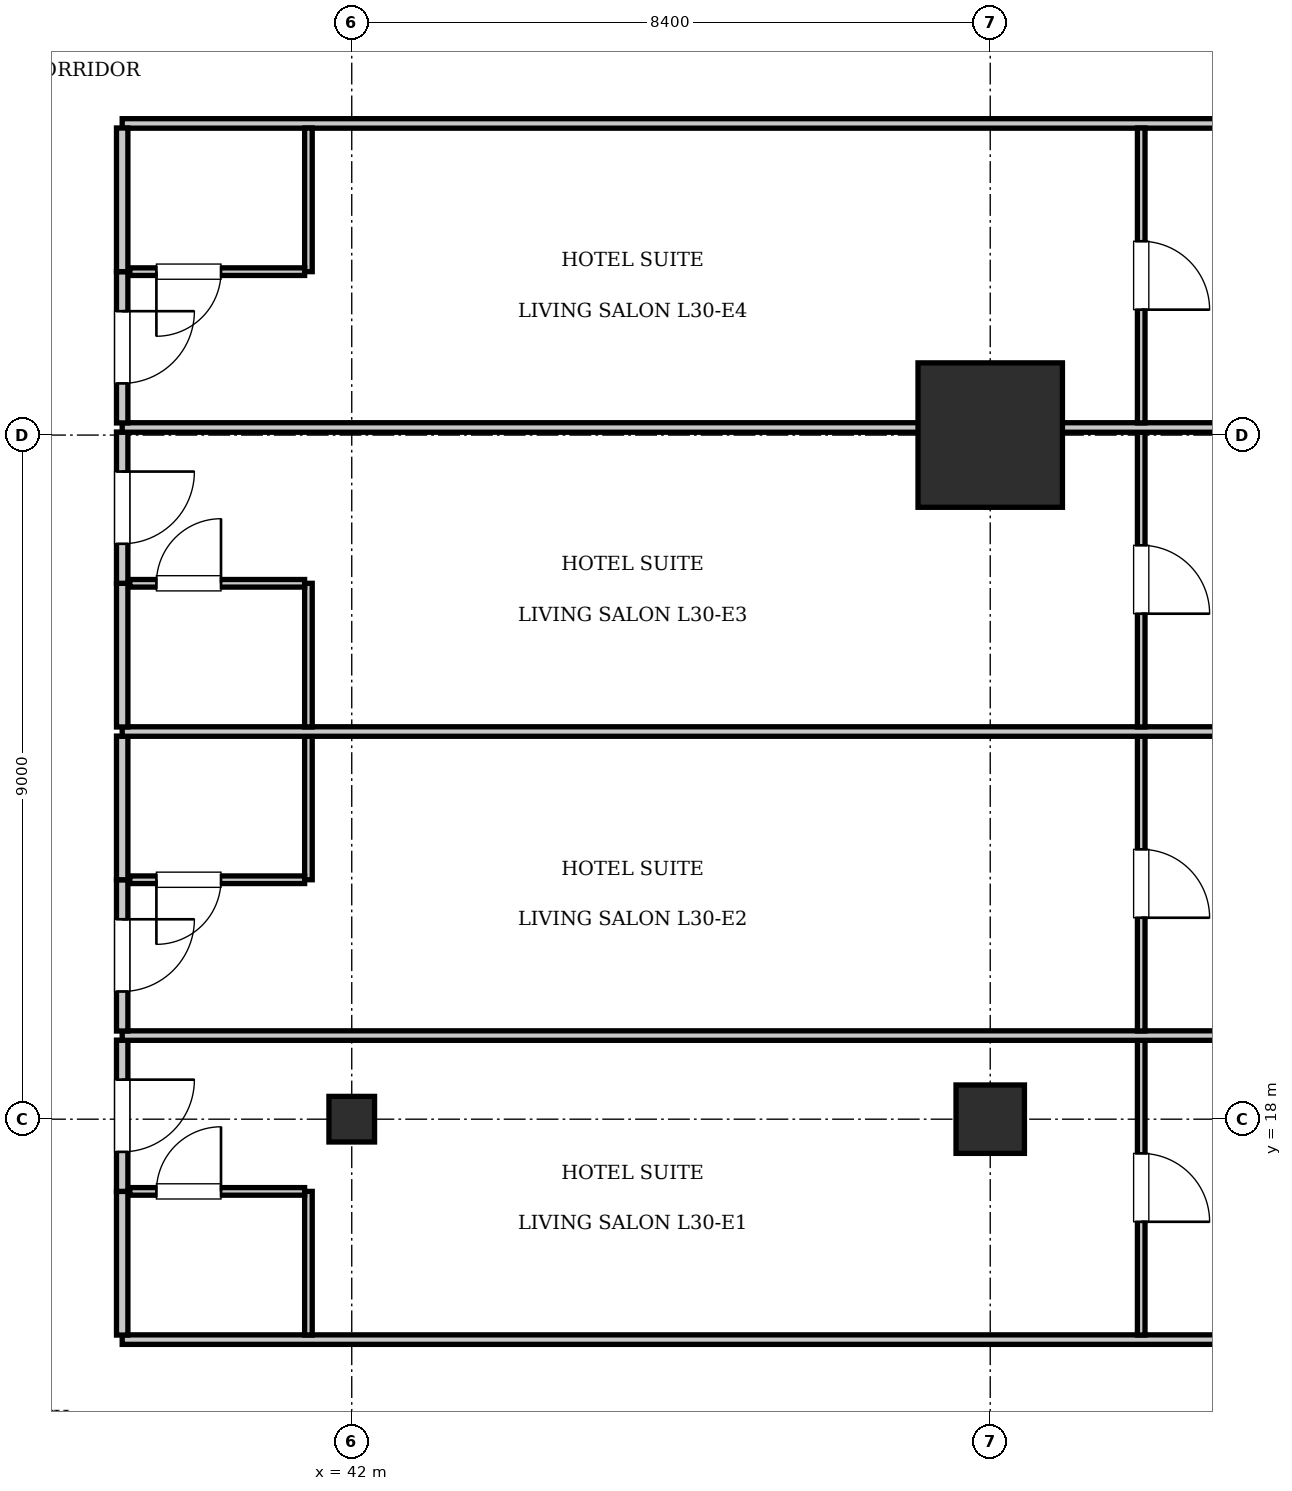
"""IFC4 building model, lengths in metres.
Left out: names, types, materials, properties, quantities, classifications, styles, units other than length and angle.
Written with IfcOpenShell. Run it as: python <this file> out.ifc"""

import sys

from ifc_helpers import new_model, si_unit, direction, frame, frame_2d, origin, origin_2d, place, context, subcontext, project, spatial, rectangle, i_section, extrude, element, fill, save


model = new_model("IFC4")
c1 = context("Model", 3, precision=1e-05, world=origin(), true_north=direction((0.0, 1.0)))
c2 = subcontext(c1, "Body", "Model", "MODEL_VIEW")
j1 = project(units=[si_unit("LENGTHUNIT", "METRE"), si_unit("PLANEANGLEUNIT", "RADIAN")], contexts=[c1])
p1 = place(None, origin())
s1 = spatial("IfcSite", under=j1, at=p1, CompositionType="ELEMENT")
p2 = place(p1, origin())
s2 = spatial("IfcBuilding", under=s1, at=p2, CompositionType="ELEMENT")
p3 = place(p2, frame((0.0, 0.0, 127.4)))
s3 = spatial("IfcBuildingStorey", under=s2, at=p3, CompositionType="ELEMENT", Elevation=127.4)
p4 = place(p3, frame((50.4, 27.0, 0.0), z_axis=(0.0, 0.0, 1.0), x_axis=(1.0, 0.0, 0.0)))
e1 = element("IfcColumn", 1, at=p4, inside=s3, PredefinedType="COLUMN", context=c2, shape_type="SweptSolid", body=[
    extrude(rectangle(XDim=1.9, YDim=1.9, at=origin_2d()), origin(), (0.0, 0.0, 1.0), 3.85),
])
p5 = place(p3, frame((50.4, 18.0, 0.0), z_axis=(0.0, 0.0, 1.0), x_axis=(1.0, 0.0, 0.0)))
e2 = element("IfcColumn", 2, at=p5, inside=s3, PredefinedType="COLUMN", context=c2, shape_type="SweptSolid", body=[
    extrude(rectangle(XDim=0.9, YDim=0.9, at=origin_2d()), origin(), (0.0, 0.0, 1.0), 3.85),
])
p6 = place(p3, frame((42.0, 18.0, 0.0), z_axis=(0.0, 0.0, 1.0), x_axis=(1.0, 0.0, 0.0)))
e3 = element("IfcColumn", 3, at=p6, inside=s3, PredefinedType="COLUMN", context=c2, shape_type="SweptSolid", body=[
    extrude(i_section(OverallWidth=0.6, OverallDepth=0.6, WebThickness=0.025, FlangeThickness=0.038, at=origin_2d()), origin(), (0.0, 0.0, 1.0), 3.85),
])
for number, where, z_axis, x_axis in (
    (4, (38.98, 15.1, 0.0), (0.0, 0.0, 1.0), (1.0, 0.0, 0.0)),
    (5, (38.98, 31.1, 0.0), (0.0, 0.0, 1.0), (1.0, 0.0, 0.0)),
):
    element("IfcWall", number, at=place(p3, frame(where, z_axis=z_axis, x_axis=x_axis)), inside=s3, PredefinedType="PARTITIONING", context=c2, shape_type="SweptSolid", body=[
        extrude(rectangle(XDim=23.42, YDim=0.125, at=frame_2d((11.71, 0.0))), origin(), (0.0, 0.0, 1.0), 3.61),
    ])
p7 = place(p3, frame((38.98, 15.16, 0.0), z_axis=(0.0, 0.0, 1.0), x_axis=(0.0, 1.0, 0.0)))
e6 = element("IfcWall", 6, at=p7, inside=s3, PredefinedType="PARTITIONING", context=c2, shape_type="SweptSolid", body=[
    extrude(rectangle(XDim=1.89, YDim=0.15, at=frame_2d((0.945, 0.0))), origin(), (0.0, 0.0, 1.0), 3.61),
])
p8 = place(p3, frame((38.98, 17.05, 0.0), z_axis=(0.0, 0.0, 1.0), x_axis=(0.0, 1.0, 0.0)))
e7 = element("IfcWall", 7, at=p8, inside=s3, PredefinedType="PARTITIONING", context=c2, shape_type="SweptSolid", body=[
    extrude(rectangle(XDim=1.99, YDim=0.15, at=frame_2d((0.995, 0.0))), origin(), (0.0, 0.0, 1.0), 3.61),
])
p9 = place(p8, frame((0.52, 0.0, 0.0)))
e8 = element("IfcOpeningElement", 8, at=p9, cuts=e7, PredefinedType="OPENING", context=c2, shape_type="SweptSolid", body=[
    extrude(rectangle(XDim=0.95, YDim=2.15, at=frame_2d((0.475, 1.075))), frame((0.0, 0.085, 0.0), z_axis=(0.0, -1.0, 0.0), x_axis=(1.0, 0.0, 0.0)), (0.0, 0.0, 1.0), 0.17),
])
p10 = place(p3, frame((41.43, 15.16, 0.0), z_axis=(0.0, 0.0, 1.0), x_axis=(0.0, 1.0, 0.0)))
e9 = element("IfcWall", 9, at=p10, inside=s3, PredefinedType="PARTITIONING", context=c2, shape_type="SweptSolid", body=[
    extrude(rectangle(XDim=1.89, YDim=0.1, at=frame_2d((0.945, 0.0))), origin(), (0.0, 0.0, 1.0), 3.61),
])
p11 = place(p3, frame((39.08, 17.05, 0.0), z_axis=(0.0, 0.0, 1.0), x_axis=(1.0, 0.0, 0.0)))
e10 = element("IfcWall", 10, at=p11, inside=s3, PredefinedType="PARTITIONING", context=c2, shape_type="SweptSolid", body=[
    extrude(rectangle(XDim=2.3, YDim=0.1, at=frame_2d((1.15, 0.0))), origin(), (0.0, 0.0, 1.0), 3.61),
])
p12 = place(p11, frame((0.35, 0.0, 0.0)))
e11 = element("IfcOpeningElement", 11, at=p12, cuts=e10, PredefinedType="OPENING", context=c2, shape_type="SweptSolid", body=[
    extrude(rectangle(XDim=0.85, YDim=2.1, at=frame_2d((0.425, 1.05))), frame((0.0, 0.06, 0.0), z_axis=(0.0, -1.0, 0.0), x_axis=(1.0, 0.0, 0.0)), (0.0, 0.0, 1.0), 0.12),
])
p13 = place(p3, frame((52.386, 15.16, 0.0), z_axis=(0.0, 0.0, 1.0), x_axis=(0.0, 1.0, 0.0)))
e12 = element("IfcWall", 12, at=p13, inside=s3, PredefinedType="PARTITIONING", context=c2, shape_type="SweptSolid", body=[
    extrude(rectangle(XDim=3.88, YDim=0.1, at=frame_2d((1.94, 0.0))), origin(), (0.0, 0.0, 1.0), 3.61),
])
p14 = place(p13, frame((1.49, 0.0, 0.0)))
e13 = element("IfcOpeningElement", 13, at=p14, cuts=e12, PredefinedType="OPENING", context=c2, shape_type="SweptSolid", body=[
    extrude(rectangle(XDim=0.9, YDim=2.1, at=frame_2d((0.45, 1.05))), frame((0.0, 0.06, 0.0), z_axis=(0.0, -1.0, 0.0), x_axis=(1.0, 0.0, 0.0)), (0.0, 0.0, 1.0), 0.12),
])
p15 = place(p3, frame((38.98, 19.1, 0.0), z_axis=(0.0, 0.0, 1.0), x_axis=(1.0, 0.0, 0.0)))
e14 = element("IfcWall", 14, at=p15, inside=s3, PredefinedType="PARTITIONING", context=c2, shape_type="SweptSolid", body=[
    extrude(rectangle(XDim=23.42, YDim=0.125, at=frame_2d((11.71, 0.0))), origin(), (0.0, 0.0, 1.0), 3.61),
])
p16 = place(p3, frame((38.98, 19.16, 0.0), z_axis=(0.0, 0.0, 1.0), x_axis=(0.0, 1.0, 0.0)))
e15 = element("IfcWall", 15, at=p16, inside=s3, PredefinedType="PARTITIONING", context=c2, shape_type="SweptSolid", body=[
    extrude(rectangle(XDim=1.99, YDim=0.15, at=frame_2d((0.995, 0.0))), origin(), (0.0, 0.0, 1.0), 3.61),
])
p17 = place(p16, frame((0.52, 0.0, 0.0)))
e16 = element("IfcOpeningElement", 16, at=p17, cuts=e15, PredefinedType="OPENING", context=c2, shape_type="SweptSolid", body=[
    extrude(rectangle(XDim=0.95, YDim=2.15, at=frame_2d((0.475, 1.075))), frame((0.0, 0.085, 0.0), z_axis=(0.0, -1.0, 0.0), x_axis=(1.0, 0.0, 0.0)), (0.0, 0.0, 1.0), 0.17),
])
p18 = place(p3, frame((38.98, 21.15, 0.0), z_axis=(0.0, 0.0, 1.0), x_axis=(0.0, 1.0, 0.0)))
e17 = element("IfcWall", 17, at=p18, inside=s3, PredefinedType="PARTITIONING", context=c2, shape_type="SweptSolid", body=[
    extrude(rectangle(XDim=1.89, YDim=0.15, at=frame_2d((0.945, 0.0))), origin(), (0.0, 0.0, 1.0), 3.61),
])
p19 = place(p3, frame((41.43, 21.15, 0.0), z_axis=(0.0, 0.0, 1.0), x_axis=(0.0, 1.0, 0.0)))
e18 = element("IfcWall", 18, at=p19, inside=s3, PredefinedType="PARTITIONING", context=c2, shape_type="SweptSolid", body=[
    extrude(rectangle(XDim=1.89, YDim=0.1, at=frame_2d((0.945, 0.0))), origin(), (0.0, 0.0, 1.0), 3.61),
])
p20 = place(p3, frame((39.08, 21.15, 0.0), z_axis=(0.0, 0.0, 1.0), x_axis=(1.0, 0.0, 0.0)))
e19 = element("IfcWall", 19, at=p20, inside=s3, PredefinedType="PARTITIONING", context=c2, shape_type="SweptSolid", body=[
    extrude(rectangle(XDim=2.3, YDim=0.1, at=frame_2d((1.15, 0.0))), origin(), (0.0, 0.0, 1.0), 3.61),
])
p21 = place(p20, frame((0.35, 0.0, 0.0)))
e20 = element("IfcOpeningElement", 20, at=p21, cuts=e19, PredefinedType="OPENING", context=c2, shape_type="SweptSolid", body=[
    extrude(rectangle(XDim=0.85, YDim=2.1, at=frame_2d((0.425, 1.05))), frame((0.0, 0.06, 0.0), z_axis=(0.0, -1.0, 0.0), x_axis=(1.0, 0.0, 0.0)), (0.0, 0.0, 1.0), 0.12),
])
p22 = place(p3, frame((52.386, 19.16, 0.0), z_axis=(0.0, 0.0, 1.0), x_axis=(0.0, 1.0, 0.0)))
e21 = element("IfcWall", 21, at=p22, inside=s3, PredefinedType="PARTITIONING", context=c2, shape_type="SweptSolid", body=[
    extrude(rectangle(XDim=3.88, YDim=0.1, at=frame_2d((1.94, 0.0))), origin(), (0.0, 0.0, 1.0), 3.61),
])
p23 = place(p22, frame((1.49, 0.0, 0.0)))
e22 = element("IfcOpeningElement", 22, at=p23, cuts=e21, PredefinedType="OPENING", context=c2, shape_type="SweptSolid", body=[
    extrude(rectangle(XDim=0.9, YDim=2.1, at=frame_2d((0.45, 1.05))), frame((0.0, 0.06, 0.0), z_axis=(0.0, -1.0, 0.0), x_axis=(1.0, 0.0, 0.0)), (0.0, 0.0, 1.0), 0.12),
])
p24 = place(p3, frame((38.98, 23.1, 0.0), z_axis=(0.0, 0.0, 1.0), x_axis=(1.0, 0.0, 0.0)))
e23 = element("IfcWall", 23, at=p24, inside=s3, PredefinedType="PARTITIONING", context=c2, shape_type="SweptSolid", body=[
    extrude(rectangle(XDim=23.42, YDim=0.125, at=frame_2d((11.71, 0.0))), origin(), (0.0, 0.0, 1.0), 3.61),
])
p25 = place(p3, frame((38.98, 23.16, 0.0), z_axis=(0.0, 0.0, 1.0), x_axis=(0.0, 1.0, 0.0)))
e24 = element("IfcWall", 24, at=p25, inside=s3, PredefinedType="PARTITIONING", context=c2, shape_type="SweptSolid", body=[
    extrude(rectangle(XDim=1.89, YDim=0.15, at=frame_2d((0.945, 0.0))), origin(), (0.0, 0.0, 1.0), 3.61),
])
p26 = place(p3, frame((38.98, 25.05, 0.0), z_axis=(0.0, 0.0, 1.0), x_axis=(0.0, 1.0, 0.0)))
e25 = element("IfcWall", 25, at=p26, inside=s3, PredefinedType="PARTITIONING", context=c2, shape_type="SweptSolid", body=[
    extrude(rectangle(XDim=1.99, YDim=0.15, at=frame_2d((0.995, 0.0))), origin(), (0.0, 0.0, 1.0), 3.61),
])
p27 = place(p26, frame((0.52, 0.0, 0.0)))
e26 = element("IfcOpeningElement", 26, at=p27, cuts=e25, PredefinedType="OPENING", context=c2, shape_type="SweptSolid", body=[
    extrude(rectangle(XDim=0.95, YDim=2.15, at=frame_2d((0.475, 1.075))), frame((0.0, 0.085, 0.0), z_axis=(0.0, -1.0, 0.0), x_axis=(1.0, 0.0, 0.0)), (0.0, 0.0, 1.0), 0.17),
])
p28 = place(p3, frame((41.43, 23.16, 0.0), z_axis=(0.0, 0.0, 1.0), x_axis=(0.0, 1.0, 0.0)))
e27 = element("IfcWall", 27, at=p28, inside=s3, PredefinedType="PARTITIONING", context=c2, shape_type="SweptSolid", body=[
    extrude(rectangle(XDim=1.89, YDim=0.1, at=frame_2d((0.945, 0.0))), origin(), (0.0, 0.0, 1.0), 3.61),
])
p29 = place(p3, frame((39.08, 25.05, 0.0), z_axis=(0.0, 0.0, 1.0), x_axis=(1.0, 0.0, 0.0)))
e28 = element("IfcWall", 28, at=p29, inside=s3, PredefinedType="PARTITIONING", context=c2, shape_type="SweptSolid", body=[
    extrude(rectangle(XDim=2.3, YDim=0.1, at=frame_2d((1.15, 0.0))), origin(), (0.0, 0.0, 1.0), 3.61),
])
p30 = place(p29, frame((0.35, 0.0, 0.0)))
e29 = element("IfcOpeningElement", 29, at=p30, cuts=e28, PredefinedType="OPENING", context=c2, shape_type="SweptSolid", body=[
    extrude(rectangle(XDim=0.85, YDim=2.1, at=frame_2d((0.425, 1.05))), frame((0.0, 0.06, 0.0), z_axis=(0.0, -1.0, 0.0), x_axis=(1.0, 0.0, 0.0)), (0.0, 0.0, 1.0), 0.12),
])
p31 = place(p3, frame((52.386, 23.16, 0.0), z_axis=(0.0, 0.0, 1.0), x_axis=(0.0, 1.0, 0.0)))
e30 = element("IfcWall", 30, at=p31, inside=s3, PredefinedType="PARTITIONING", context=c2, shape_type="SweptSolid", body=[
    extrude(rectangle(XDim=3.88, YDim=0.1, at=frame_2d((1.94, 0.0))), origin(), (0.0, 0.0, 1.0), 3.61),
])
p32 = place(p31, frame((1.49, 0.0, 0.0)))
e31 = element("IfcOpeningElement", 31, at=p32, cuts=e30, PredefinedType="OPENING", context=c2, shape_type="SweptSolid", body=[
    extrude(rectangle(XDim=0.9, YDim=2.1, at=frame_2d((0.45, 1.05))), frame((0.0, 0.06, 0.0), z_axis=(0.0, -1.0, 0.0), x_axis=(1.0, 0.0, 0.0)), (0.0, 0.0, 1.0), 0.12),
])
p33 = place(p3, frame((38.98, 27.1, 0.0), z_axis=(0.0, 0.0, 1.0), x_axis=(1.0, 0.0, 0.0)))
e32 = element("IfcWall", 32, at=p33, inside=s3, PredefinedType="PARTITIONING", context=c2, shape_type="SweptSolid", body=[
    extrude(rectangle(XDim=23.42, YDim=0.125, at=frame_2d((11.71, 0.0))), origin(), (0.0, 0.0, 1.0), 2.41),
])
p34 = place(p3, frame((38.98, 27.16, 0.0), z_axis=(0.0, 0.0, 1.0), x_axis=(0.0, 1.0, 0.0)))
e33 = element("IfcWall", 33, at=p34, inside=s3, PredefinedType="PARTITIONING", context=c2, shape_type="SweptSolid", body=[
    extrude(rectangle(XDim=1.99, YDim=0.15, at=frame_2d((0.995, 0.0))), origin(), (0.0, 0.0, 1.0), 3.61),
])
p35 = place(p34, frame((0.52, 0.0, 0.0)))
e34 = element("IfcOpeningElement", 34, at=p35, cuts=e33, PredefinedType="OPENING", context=c2, shape_type="SweptSolid", body=[
    extrude(rectangle(XDim=0.95, YDim=2.15, at=frame_2d((0.475, 1.075))), frame((0.0, 0.085, 0.0), z_axis=(0.0, -1.0, 0.0), x_axis=(1.0, 0.0, 0.0)), (0.0, 0.0, 1.0), 0.17),
])
p36 = place(p3, frame((38.98, 29.15, 0.0), z_axis=(0.0, 0.0, 1.0), x_axis=(0.0, 1.0, 0.0)))
e35 = element("IfcWall", 35, at=p36, inside=s3, PredefinedType="PARTITIONING", context=c2, shape_type="SweptSolid", body=[
    extrude(rectangle(XDim=1.89, YDim=0.15, at=frame_2d((0.945, 0.0))), origin(), (0.0, 0.0, 1.0), 3.61),
])
p37 = place(p3, frame((41.43, 29.15, 0.0), z_axis=(0.0, 0.0, 1.0), x_axis=(0.0, 1.0, 0.0)))
e36 = element("IfcWall", 36, at=p37, inside=s3, PredefinedType="PARTITIONING", context=c2, shape_type="SweptSolid", body=[
    extrude(rectangle(XDim=1.89, YDim=0.1, at=frame_2d((0.945, 0.0))), origin(), (0.0, 0.0, 1.0), 3.61),
])
p38 = place(p3, frame((39.08, 29.15, 0.0), z_axis=(0.0, 0.0, 1.0), x_axis=(1.0, 0.0, 0.0)))
e37 = element("IfcWall", 37, at=p38, inside=s3, PredefinedType="PARTITIONING", context=c2, shape_type="SweptSolid", body=[
    extrude(rectangle(XDim=2.3, YDim=0.1, at=frame_2d((1.15, 0.0))), origin(), (0.0, 0.0, 1.0), 3.61),
])
p39 = place(p38, frame((0.35, 0.0, 0.0)))
e38 = element("IfcOpeningElement", 38, at=p39, cuts=e37, PredefinedType="OPENING", context=c2, shape_type="SweptSolid", body=[
    extrude(rectangle(XDim=0.85, YDim=2.1, at=frame_2d((0.425, 1.05))), frame((0.0, 0.06, 0.0), z_axis=(0.0, -1.0, 0.0), x_axis=(1.0, 0.0, 0.0)), (0.0, 0.0, 1.0), 0.12),
])
p40 = place(p3, frame((52.386, 27.16, 0.0), z_axis=(0.0, 0.0, 1.0), x_axis=(0.0, 1.0, 0.0)))
e39 = element("IfcWall", 39, at=p40, inside=s3, PredefinedType="PARTITIONING", context=c2, shape_type="SweptSolid", body=[
    extrude(rectangle(XDim=3.88, YDim=0.1, at=frame_2d((1.94, 0.0))), origin(), (0.0, 0.0, 1.0), 3.61),
])
p41 = place(p40, frame((1.49, 0.0, 0.0)))
e40 = element("IfcOpeningElement", 40, at=p41, cuts=e39, PredefinedType="OPENING", context=c2, shape_type="SweptSolid", body=[
    extrude(rectangle(XDim=0.9, YDim=2.1, at=frame_2d((0.45, 1.05))), frame((0.0, 0.06, 0.0), z_axis=(0.0, -1.0, 0.0), x_axis=(1.0, 0.0, 0.0)), (0.0, 0.0, 1.0), 0.12),
])
p42 = place(p12, origin())
e41 = element("IfcDoor", 41, at=p42, inside=s3, OperationType="SINGLE_SWING_RIGHT", PredefinedType="DOOR", context=c2, shape_type="SweptSolid", body=[
    extrude(rectangle(XDim=0.85, YDim=2.1, at=frame_2d((0.425, 1.05))), frame((0.0, 0.025, 0.0), z_axis=(0.0, -1.0, 0.0), x_axis=(1.0, 0.0, 0.0)), (0.0, 0.0, 1.0), 0.05),
])
fill(e11, e41)
p43 = place(p9, frame((0.95, 0.0, 0.0), z_axis=(0.0, 0.0, 1.0), x_axis=(-1.0, 0.0, 0.0)))
e42 = element("IfcDoor", 42, at=p43, inside=s3, OperationType="SINGLE_SWING_LEFT", PredefinedType="DOOR", context=c2, shape_type="SweptSolid", body=[
    extrude(rectangle(XDim=0.95, YDim=2.15, at=frame_2d((0.475, 1.075))), frame((0.0, 0.025, 0.0), z_axis=(0.0, -1.0, 0.0), x_axis=(1.0, 0.0, 0.0)), (0.0, 0.0, 1.0), 0.05),
])
fill(e8, e42)
p44 = place(p14, frame((0.9, 0.0, 0.0), z_axis=(0.0, 0.0, 1.0), x_axis=(-1.0, 0.0, 0.0)))
e43 = element("IfcDoor", 43, at=p44, inside=s3, OperationType="SINGLE_SWING_RIGHT", PredefinedType="DOOR", context=c2, shape_type="SweptSolid", body=[
    extrude(rectangle(XDim=0.9, YDim=2.1, at=frame_2d((0.45, 1.05))), frame((0.0, 0.025, 0.0), z_axis=(0.0, -1.0, 0.0), x_axis=(1.0, 0.0, 0.0)), (0.0, 0.0, 1.0), 0.05),
])
fill(e13, e43)
p45 = place(p21, frame((0.85, 0.0, 0.0), z_axis=(0.0, 0.0, 1.0), x_axis=(-1.0, 0.0, 0.0)))
e44 = element("IfcDoor", 44, at=p45, inside=s3, OperationType="SINGLE_SWING_RIGHT", PredefinedType="DOOR", context=c2, shape_type="SweptSolid", body=[
    extrude(rectangle(XDim=0.85, YDim=2.1, at=frame_2d((0.425, 1.05))), frame((0.0, 0.025, 0.0), z_axis=(0.0, -1.0, 0.0), x_axis=(1.0, 0.0, 0.0)), (0.0, 0.0, 1.0), 0.05),
])
fill(e20, e44)
p46 = place(p17, frame((0.95, 0.0, 0.0), z_axis=(0.0, 0.0, 1.0), x_axis=(-1.0, 0.0, 0.0)))
e45 = element("IfcDoor", 45, at=p46, inside=s3, OperationType="SINGLE_SWING_LEFT", PredefinedType="DOOR", context=c2, shape_type="SweptSolid", body=[
    extrude(rectangle(XDim=0.95, YDim=2.15, at=frame_2d((0.475, 1.075))), frame((0.0, 0.025, 0.0), z_axis=(0.0, -1.0, 0.0), x_axis=(1.0, 0.0, 0.0)), (0.0, 0.0, 1.0), 0.05),
])
fill(e16, e45)
p47 = place(p23, frame((0.9, 0.0, 0.0), z_axis=(0.0, 0.0, 1.0), x_axis=(-1.0, 0.0, 0.0)))
e46 = element("IfcDoor", 46, at=p47, inside=s3, OperationType="SINGLE_SWING_RIGHT", PredefinedType="DOOR", context=c2, shape_type="SweptSolid", body=[
    extrude(rectangle(XDim=0.9, YDim=2.1, at=frame_2d((0.45, 1.05))), frame((0.0, 0.025, 0.0), z_axis=(0.0, -1.0, 0.0), x_axis=(1.0, 0.0, 0.0)), (0.0, 0.0, 1.0), 0.05),
])
fill(e22, e46)
p48 = place(p30, origin())
e47 = element("IfcDoor", 47, at=p48, inside=s3, OperationType="SINGLE_SWING_RIGHT", PredefinedType="DOOR", context=c2, shape_type="SweptSolid", body=[
    extrude(rectangle(XDim=0.85, YDim=2.1, at=frame_2d((0.425, 1.05))), frame((0.0, 0.025, 0.0), z_axis=(0.0, -1.0, 0.0), x_axis=(1.0, 0.0, 0.0)), (0.0, 0.0, 1.0), 0.05),
])
fill(e29, e47)
p49 = place(p27, frame((0.95, 0.0, 0.0), z_axis=(0.0, 0.0, 1.0), x_axis=(-1.0, 0.0, 0.0)))
e48 = element("IfcDoor", 48, at=p49, inside=s3, OperationType="SINGLE_SWING_LEFT", PredefinedType="DOOR", context=c2, shape_type="SweptSolid", body=[
    extrude(rectangle(XDim=0.95, YDim=2.15, at=frame_2d((0.475, 1.075))), frame((0.0, 0.025, 0.0), z_axis=(0.0, -1.0, 0.0), x_axis=(1.0, 0.0, 0.0)), (0.0, 0.0, 1.0), 0.05),
])
fill(e26, e48)
p50 = place(p32, frame((0.9, 0.0, 0.0), z_axis=(0.0, 0.0, 1.0), x_axis=(-1.0, 0.0, 0.0)))
e49 = element("IfcDoor", 49, at=p50, inside=s3, OperationType="SINGLE_SWING_RIGHT", PredefinedType="DOOR", context=c2, shape_type="SweptSolid", body=[
    extrude(rectangle(XDim=0.9, YDim=2.1, at=frame_2d((0.45, 1.05))), frame((0.0, 0.025, 0.0), z_axis=(0.0, -1.0, 0.0), x_axis=(1.0, 0.0, 0.0)), (0.0, 0.0, 1.0), 0.05),
])
fill(e31, e49)
p51 = place(p39, frame((0.85, 0.0, 0.0), z_axis=(0.0, 0.0, 1.0), x_axis=(-1.0, 0.0, 0.0)))
e50 = element("IfcDoor", 50, at=p51, inside=s3, OperationType="SINGLE_SWING_RIGHT", PredefinedType="DOOR", context=c2, shape_type="SweptSolid", body=[
    extrude(rectangle(XDim=0.85, YDim=2.1, at=frame_2d((0.425, 1.05))), frame((0.0, 0.025, 0.0), z_axis=(0.0, -1.0, 0.0), x_axis=(1.0, 0.0, 0.0)), (0.0, 0.0, 1.0), 0.05),
])
fill(e38, e50)
p52 = place(p35, frame((0.95, 0.0, 0.0), z_axis=(0.0, 0.0, 1.0), x_axis=(-1.0, 0.0, 0.0)))
e51 = element("IfcDoor", 51, at=p52, inside=s3, OperationType="SINGLE_SWING_LEFT", PredefinedType="DOOR", context=c2, shape_type="SweptSolid", body=[
    extrude(rectangle(XDim=0.95, YDim=2.15, at=frame_2d((0.475, 1.075))), frame((0.0, 0.025, 0.0), z_axis=(0.0, -1.0, 0.0), x_axis=(1.0, 0.0, 0.0)), (0.0, 0.0, 1.0), 0.05),
])
fill(e34, e51)
p53 = place(p41, frame((0.9, 0.0, 0.0), z_axis=(0.0, 0.0, 1.0), x_axis=(-1.0, 0.0, 0.0)))
e52 = element("IfcDoor", 52, at=p53, inside=s3, OperationType="SINGLE_SWING_RIGHT", PredefinedType="DOOR", context=c2, shape_type="SweptSolid", body=[
    extrude(rectangle(XDim=0.9, YDim=2.1, at=frame_2d((0.45, 1.05))), frame((0.0, 0.025, 0.0), z_axis=(0.0, -1.0, 0.0), x_axis=(1.0, 0.0, 0.0)), (0.0, 0.0, 1.0), 0.05),
])
fill(e40, e52)
save(model, sys.argv[1])
